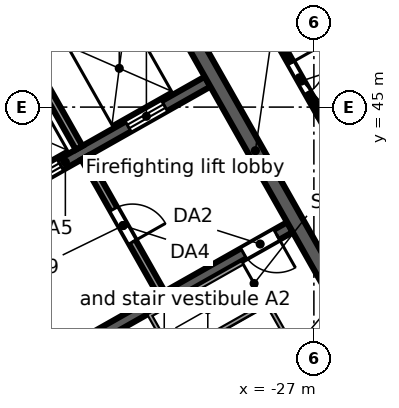
"""IFC4 building model, lengths in metres.
Left out: names, types, materials, properties, quantities, classifications, styles, units other than length and angle.
Written with IfcOpenShell. Run it as: python <this file> out.ifc"""

import sys

from ifc_helpers import new_model, si_unit, direction, frame, frame_2d, origin, place, context, subcontext, project, spatial, rectangle, extrude, element, fill, save


model = new_model("IFC4")
c1 = context("Model", 3, precision=1e-05, world=origin(), true_north=direction((0.0, 1.0)))
c2 = subcontext(c1, "Body", "Model", "MODEL_VIEW")
j1 = project(units=[si_unit("LENGTHUNIT", "METRE"), si_unit("PLANEANGLEUNIT", "RADIAN")], contexts=[c1])
p1 = place(None, origin())
s1 = spatial("IfcSite", under=j1, at=p1, CompositionType="ELEMENT")
p2 = place(p1, origin())
s2 = spatial("IfcBuilding", under=s1, at=p2, CompositionType="ELEMENT")
p3 = place(p2, frame((0.0, 0.0, 281.7)))
s3 = spatial("IfcBuildingStorey", under=s2, at=p3, CompositionType="ELEMENT", Elevation=281.7)
p4 = place(p3, frame((-58.732, 38.771, 0.0), z_axis=(0.0, 0.0, 1.0), x_axis=(0.870355615581, 0.492423702137, 0.0)))
e1 = element("IfcWall", 1, at=p4, inside=s3, PredefinedType="STANDARD", context=c2, shape_type="SweptSolid", body=[
    extrude(rectangle(XDim=64.052, YDim=0.25, at=frame_2d((32.026, 0.0))), origin(), (0.0, 0.0, 1.0), 3.45),
])
p5 = place(p4, frame((61.259, 0.0, 0.8)))
e2 = element("IfcOpeningElement", 2, at=p5, cuts=e1, PredefinedType="OPENING", context=c2, shape_type="SweptSolid", body=[
    extrude(rectangle(XDim=2.4, YDim=2.2, at=frame_2d((1.2, 1.1))), frame((0.0, 0.135, 0.0), z_axis=(0.0, -1.0, 0.0), x_axis=(1.0, 0.0, 0.0)), (0.0, 0.0, 1.0), 0.27),
])
p6 = place(p4, frame((58.216, 0.0, 0.8)))
e3 = element("IfcOpeningElement", 3, at=p6, cuts=e1, PredefinedType="OPENING", context=c2, shape_type="SweptSolid", body=[
    extrude(rectangle(XDim=2.4, YDim=2.2, at=frame_2d((1.2, 1.1))), frame((0.0, 0.135, 0.0), z_axis=(0.0, -1.0, 0.0), x_axis=(1.0, 0.0, 0.0)), (0.0, 0.0, 1.0), 0.27),
])
p7 = place(p4, frame((55.173, 0.0, 0.8)))
e4 = element("IfcOpeningElement", 4, at=p7, cuts=e1, PredefinedType="OPENING", context=c2, shape_type="SweptSolid", body=[
    extrude(rectangle(XDim=2.4, YDim=2.2, at=frame_2d((1.2, 1.1))), frame((0.0, 0.135, 0.0), z_axis=(0.0, -1.0, 0.0), x_axis=(1.0, 0.0, 0.0)), (0.0, 0.0, 1.0), 0.27),
])
p8 = place(p4, frame((52.129, 0.0, 0.8)))
e5 = element("IfcOpeningElement", 5, at=p8, cuts=e1, PredefinedType="OPENING", context=c2, shape_type="SweptSolid", body=[
    extrude(rectangle(XDim=2.4, YDim=2.2, at=frame_2d((1.2, 1.1))), frame((0.0, 0.135, 0.0), z_axis=(0.0, -1.0, 0.0), x_axis=(1.0, 0.0, 0.0)), (0.0, 0.0, 1.0), 0.27),
])
p9 = place(p4, frame((49.086, 0.0, 0.8)))
e6 = element("IfcOpeningElement", 6, at=p9, cuts=e1, PredefinedType="OPENING", context=c2, shape_type="SweptSolid", body=[
    extrude(rectangle(XDim=2.4, YDim=2.2, at=frame_2d((1.2, 1.1))), frame((0.0, 0.135, 0.0), z_axis=(0.0, -1.0, 0.0), x_axis=(1.0, 0.0, 0.0)), (0.0, 0.0, 1.0), 0.27),
])
p10 = place(p4, frame((46.043, 0.0, 0.8)))
e7 = element("IfcOpeningElement", 7, at=p10, cuts=e1, PredefinedType="OPENING", context=c2, shape_type="SweptSolid", body=[
    extrude(rectangle(XDim=2.4, YDim=2.2, at=frame_2d((1.2, 1.1))), frame((0.0, 0.135, 0.0), z_axis=(0.0, -1.0, 0.0), x_axis=(1.0, 0.0, 0.0)), (0.0, 0.0, 1.0), 0.27),
])
p11 = place(p4, frame((43.0, 0.0, 0.8)))
e8 = element("IfcOpeningElement", 8, at=p11, cuts=e1, PredefinedType="OPENING", context=c2, shape_type="SweptSolid", body=[
    extrude(rectangle(XDim=2.4, YDim=2.2, at=frame_2d((1.2, 1.1))), frame((0.0, 0.135, 0.0), z_axis=(0.0, -1.0, 0.0), x_axis=(1.0, 0.0, 0.0)), (0.0, 0.0, 1.0), 0.27),
])
p12 = place(p4, frame((39.956, 0.0, 0.8)))
e9 = element("IfcOpeningElement", 9, at=p12, cuts=e1, PredefinedType="OPENING", context=c2, shape_type="SweptSolid", body=[
    extrude(rectangle(XDim=2.4, YDim=2.2, at=frame_2d((1.2, 1.1))), frame((0.0, 0.135, 0.0), z_axis=(0.0, -1.0, 0.0), x_axis=(1.0, 0.0, 0.0)), (0.0, 0.0, 1.0), 0.27),
])
p13 = place(p4, frame((36.913, 0.0, 0.8)))
e10 = element("IfcOpeningElement", 10, at=p13, cuts=e1, PredefinedType="OPENING", context=c2, shape_type="SweptSolid", body=[
    extrude(rectangle(XDim=2.4, YDim=2.2, at=frame_2d((1.2, 1.1))), frame((0.0, 0.135, 0.0), z_axis=(0.0, -1.0, 0.0), x_axis=(1.0, 0.0, 0.0)), (0.0, 0.0, 1.0), 0.27),
])
p14 = place(p4, frame((33.87, 0.0, 0.8)))
e11 = element("IfcOpeningElement", 11, at=p14, cuts=e1, PredefinedType="OPENING", context=c2, shape_type="SweptSolid", body=[
    extrude(rectangle(XDim=2.4, YDim=2.2, at=frame_2d((1.2, 1.1))), frame((0.0, 0.135, 0.0), z_axis=(0.0, -1.0, 0.0), x_axis=(1.0, 0.0, 0.0)), (0.0, 0.0, 1.0), 0.27),
])
p15 = place(p4, frame((30.826, 0.0, 0.8)))
e12 = element("IfcOpeningElement", 12, at=p15, cuts=e1, PredefinedType="OPENING", context=c2, shape_type="SweptSolid", body=[
    extrude(rectangle(XDim=2.4, YDim=2.2, at=frame_2d((1.2, 1.1))), frame((0.0, 0.135, 0.0), z_axis=(0.0, -1.0, 0.0), x_axis=(1.0, 0.0, 0.0)), (0.0, 0.0, 1.0), 0.27),
])
p16 = place(p4, frame((27.783, 0.0, 0.8)))
e13 = element("IfcOpeningElement", 13, at=p16, cuts=e1, PredefinedType="OPENING", context=c2, shape_type="SweptSolid", body=[
    extrude(rectangle(XDim=2.4, YDim=2.2, at=frame_2d((1.2, 1.1))), frame((0.0, 0.135, 0.0), z_axis=(0.0, -1.0, 0.0), x_axis=(1.0, 0.0, 0.0)), (0.0, 0.0, 1.0), 0.27),
])
p17 = place(p4, frame((24.74, 0.0, 0.8)))
e14 = element("IfcOpeningElement", 14, at=p17, cuts=e1, PredefinedType="OPENING", context=c2, shape_type="SweptSolid", body=[
    extrude(rectangle(XDim=2.4, YDim=2.2, at=frame_2d((1.2, 1.1))), frame((0.0, 0.135, 0.0), z_axis=(0.0, -1.0, 0.0), x_axis=(1.0, 0.0, 0.0)), (0.0, 0.0, 1.0), 0.27),
])
p18 = place(p4, frame((21.696, 0.0, 0.8)))
e15 = element("IfcOpeningElement", 15, at=p18, cuts=e1, PredefinedType="OPENING", context=c2, shape_type="SweptSolid", body=[
    extrude(rectangle(XDim=2.4, YDim=2.2, at=frame_2d((1.2, 1.1))), frame((0.0, 0.135, 0.0), z_axis=(0.0, -1.0, 0.0), x_axis=(1.0, 0.0, 0.0)), (0.0, 0.0, 1.0), 0.27),
])
p19 = place(p4, frame((18.653, 0.0, 0.8)))
e16 = element("IfcOpeningElement", 16, at=p19, cuts=e1, PredefinedType="OPENING", context=c2, shape_type="SweptSolid", body=[
    extrude(rectangle(XDim=2.4, YDim=2.2, at=frame_2d((1.2, 1.1))), frame((0.0, 0.135, 0.0), z_axis=(0.0, -1.0, 0.0), x_axis=(1.0, 0.0, 0.0)), (0.0, 0.0, 1.0), 0.27),
])
p20 = place(p4, frame((15.61, 0.0, 0.8)))
e17 = element("IfcOpeningElement", 17, at=p20, cuts=e1, PredefinedType="OPENING", context=c2, shape_type="SweptSolid", body=[
    extrude(rectangle(XDim=2.4, YDim=2.2, at=frame_2d((1.2, 1.1))), frame((0.0, 0.135, 0.0), z_axis=(0.0, -1.0, 0.0), x_axis=(1.0, 0.0, 0.0)), (0.0, 0.0, 1.0), 0.27),
])
p21 = place(p4, frame((12.567, 0.0, 0.8)))
e18 = element("IfcOpeningElement", 18, at=p21, cuts=e1, PredefinedType="OPENING", context=c2, shape_type="SweptSolid", body=[
    extrude(rectangle(XDim=2.4, YDim=2.2, at=frame_2d((1.2, 1.1))), frame((0.0, 0.135, 0.0), z_axis=(0.0, -1.0, 0.0), x_axis=(1.0, 0.0, 0.0)), (0.0, 0.0, 1.0), 0.27),
])
p22 = place(p4, frame((9.523, 0.0, 0.8)))
e19 = element("IfcOpeningElement", 19, at=p22, cuts=e1, PredefinedType="OPENING", context=c2, shape_type="SweptSolid", body=[
    extrude(rectangle(XDim=2.4, YDim=2.2, at=frame_2d((1.2, 1.1))), frame((0.0, 0.135, 0.0), z_axis=(0.0, -1.0, 0.0), x_axis=(1.0, 0.0, 0.0)), (0.0, 0.0, 1.0), 0.27),
])
p23 = place(p4, frame((6.48, 0.0, 0.8)))
e20 = element("IfcOpeningElement", 20, at=p23, cuts=e1, PredefinedType="OPENING", context=c2, shape_type="SweptSolid", body=[
    extrude(rectangle(XDim=2.4, YDim=2.2, at=frame_2d((1.2, 1.1))), frame((0.0, 0.135, 0.0), z_axis=(0.0, -1.0, 0.0), x_axis=(1.0, 0.0, 0.0)), (0.0, 0.0, 1.0), 0.27),
])
p24 = place(p4, frame((3.437, 0.0, 0.8)))
e21 = element("IfcOpeningElement", 21, at=p24, cuts=e1, PredefinedType="OPENING", context=c2, shape_type="SweptSolid", body=[
    extrude(rectangle(XDim=2.4, YDim=2.2, at=frame_2d((1.2, 1.1))), frame((0.0, 0.135, 0.0), z_axis=(0.0, -1.0, 0.0), x_axis=(1.0, 0.0, 0.0)), (0.0, 0.0, 1.0), 0.27),
])
p25 = place(p4, frame((0.393, 0.0, 0.8)))
e22 = element("IfcOpeningElement", 22, at=p25, cuts=e1, PredefinedType="OPENING", context=c2, shape_type="SweptSolid", body=[
    extrude(rectangle(XDim=2.4, YDim=2.2, at=frame_2d((1.2, 1.1))), frame((0.0, 0.135, 0.0), z_axis=(0.0, -1.0, 0.0), x_axis=(1.0, 0.0, 0.0)), (0.0, 0.0, 1.0), 0.27),
])
p26 = place(p3, frame((-3.017, 46.293, 0.0), z_axis=(0.0, 0.0, 1.0), x_axis=(-0.870355474887, -0.492423950812, 0.0)))
e23 = element("IfcWall", 23, at=p26, inside=s3, PredefinedType="STANDARD", context=c2, shape_type="SweptSolid", body=[
    extrude(rectangle(XDim=40.34, YDim=0.25, at=frame_2d((20.17, 0.0))), origin(), (0.0, 0.0, 1.0), 3.45),
])
p27 = place(p26, frame((37.428, 0.0, 0.8)))
e24 = element("IfcOpeningElement", 24, at=p27, cuts=e23, PredefinedType="OPENING", context=c2, shape_type="SweptSolid", body=[
    extrude(rectangle(XDim=2.4, YDim=2.2, at=frame_2d((1.2, 1.1))), frame((0.0, 0.135, 0.0), z_axis=(0.0, -1.0, 0.0), x_axis=(1.0, 0.0, 0.0)), (0.0, 0.0, 1.0), 0.27),
])
p28 = place(p26, frame((34.372, 0.0, 0.0)))
e25 = element("IfcOpeningElement", 25, at=p28, cuts=e23, PredefinedType="OPENING", context=c2, shape_type="SweptSolid", body=[
    extrude(rectangle(XDim=1.8, YDim=2.4, at=frame_2d((0.9, 1.2))), frame((0.0, 0.135, 0.0), z_axis=(0.0, -1.0, 0.0), x_axis=(1.0, 0.0, 0.0)), (0.0, 0.0, 1.0), 0.27),
])
p29 = place(p26, frame((30.716, 0.0, 0.8)))
e26 = element("IfcOpeningElement", 26, at=p29, cuts=e23, PredefinedType="OPENING", context=c2, shape_type="SweptSolid", body=[
    extrude(rectangle(XDim=2.4, YDim=2.2, at=frame_2d((1.2, 1.1))), frame((0.0, 0.135, 0.0), z_axis=(0.0, -1.0, 0.0), x_axis=(1.0, 0.0, 0.0)), (0.0, 0.0, 1.0), 0.27),
])
p30 = place(p26, frame((27.36, 0.0, 0.8)))
e27 = element("IfcOpeningElement", 27, at=p30, cuts=e23, PredefinedType="OPENING", context=c2, shape_type="SweptSolid", body=[
    extrude(rectangle(XDim=2.4, YDim=2.2, at=frame_2d((1.2, 1.1))), frame((0.0, 0.135, 0.0), z_axis=(0.0, -1.0, 0.0), x_axis=(1.0, 0.0, 0.0)), (0.0, 0.0, 1.0), 0.27),
])
p31 = place(p26, frame((24.304, 0.0, 0.0)))
e28 = element("IfcOpeningElement", 28, at=p31, cuts=e23, PredefinedType="OPENING", context=c2, shape_type="SweptSolid", body=[
    extrude(rectangle(XDim=1.8, YDim=2.4, at=frame_2d((0.9, 1.2))), frame((0.0, 0.135, 0.0), z_axis=(0.0, -1.0, 0.0), x_axis=(1.0, 0.0, 0.0)), (0.0, 0.0, 1.0), 0.27),
])
p32 = place(p26, frame((20.648, 0.0, 0.8)))
e29 = element("IfcOpeningElement", 29, at=p32, cuts=e23, PredefinedType="OPENING", context=c2, shape_type="SweptSolid", body=[
    extrude(rectangle(XDim=2.4, YDim=2.2, at=frame_2d((1.2, 1.1))), frame((0.0, 0.135, 0.0), z_axis=(0.0, -1.0, 0.0), x_axis=(1.0, 0.0, 0.0)), (0.0, 0.0, 1.0), 0.27),
])
p33 = place(p26, frame((17.292, 0.0, 0.8)))
e30 = element("IfcOpeningElement", 30, at=p33, cuts=e23, PredefinedType="OPENING", context=c2, shape_type="SweptSolid", body=[
    extrude(rectangle(XDim=2.4, YDim=2.2, at=frame_2d((1.2, 1.1))), frame((0.0, 0.135, 0.0), z_axis=(0.0, -1.0, 0.0), x_axis=(1.0, 0.0, 0.0)), (0.0, 0.0, 1.0), 0.27),
])
p34 = place(p26, frame((14.236, 0.0, 0.0)))
e31 = element("IfcOpeningElement", 31, at=p34, cuts=e23, PredefinedType="OPENING", context=c2, shape_type="SweptSolid", body=[
    extrude(rectangle(XDim=1.8, YDim=2.4, at=frame_2d((0.9, 1.2))), frame((0.0, 0.135, 0.0), z_axis=(0.0, -1.0, 0.0), x_axis=(1.0, 0.0, 0.0)), (0.0, 0.0, 1.0), 0.27),
])
p35 = place(p26, frame((10.58, 0.0, 0.8)))
e32 = element("IfcOpeningElement", 32, at=p35, cuts=e23, PredefinedType="OPENING", context=c2, shape_type="SweptSolid", body=[
    extrude(rectangle(XDim=2.4, YDim=2.2, at=frame_2d((1.2, 1.1))), frame((0.0, 0.135, 0.0), z_axis=(0.0, -1.0, 0.0), x_axis=(1.0, 0.0, 0.0)), (0.0, 0.0, 1.0), 0.27),
])
p36 = place(p26, frame((7.224, 0.0, 0.8)))
e33 = element("IfcOpeningElement", 33, at=p36, cuts=e23, PredefinedType="OPENING", context=c2, shape_type="SweptSolid", body=[
    extrude(rectangle(XDim=2.4, YDim=2.2, at=frame_2d((1.2, 1.1))), frame((0.0, 0.135, 0.0), z_axis=(0.0, -1.0, 0.0), x_axis=(1.0, 0.0, 0.0)), (0.0, 0.0, 1.0), 0.27),
])
p37 = place(p26, frame((4.168, 0.0, 0.0)))
e34 = element("IfcOpeningElement", 34, at=p37, cuts=e23, PredefinedType="OPENING", context=c2, shape_type="SweptSolid", body=[
    extrude(rectangle(XDim=1.8, YDim=2.4, at=frame_2d((0.9, 1.2))), frame((0.0, 0.135, 0.0), z_axis=(0.0, -1.0, 0.0), x_axis=(1.0, 0.0, 0.0)), (0.0, 0.0, 1.0), 0.27),
])
p38 = place(p26, frame((0.512, 0.0, 0.8)))
e35 = element("IfcOpeningElement", 35, at=p38, cuts=e23, PredefinedType="OPENING", context=c2, shape_type="SweptSolid", body=[
    extrude(rectangle(XDim=2.4, YDim=2.2, at=frame_2d((1.2, 1.1))), frame((0.0, 0.135, 0.0), z_axis=(0.0, -1.0, 0.0), x_axis=(1.0, 0.0, 0.0)), (0.0, 0.0, 1.0), 0.27),
])
p39 = place(p3, frame((-34.245, 38.097, 0.0), z_axis=(0.0, 0.0, 1.0), x_axis=(0.870356351998, 0.492422400523, 0.0)))
e36 = element("IfcWall", 36, at=p39, inside=s3, PredefinedType="SOLIDWALL", context=c2, shape_type="SweptSolid", body=[
    extrude(rectangle(XDim=7.6, YDim=0.3, at=frame_2d((3.8, 0.0))), origin(), (0.0, 0.0, 1.0), 3.45),
])
p40 = place(p39, frame((6.2, 0.0, 0.0)))
e37 = element("IfcOpeningElement", 37, at=p40, cuts=e36, PredefinedType="OPENING", context=c2, shape_type="SweptSolid", body=[
    extrude(rectangle(XDim=1.0, YDim=2.1, at=frame_2d((0.5, 1.05))), frame((0.0, 0.16, 0.0), z_axis=(0.0, -1.0, 0.0), x_axis=(1.0, 0.0, 0.0)), (0.0, 0.0, 1.0), 0.32),
])
p41 = place(p3, frame((-37.282, 41.435, 0.0), z_axis=(0.0, 0.0, 1.0), x_axis=(0.870361315115, 0.492413628113, 0.0)))
e38 = element("IfcWall", 38, at=p41, inside=s3, PredefinedType="SOLIDWALL", context=c2, shape_type="SweptSolid", body=[
    extrude(rectangle(XDim=8.6, YDim=0.3, at=frame_2d((4.3, 0.0))), origin(), (0.0, 0.0, 1.0), 3.45),
])
p42 = place(p41, frame((0.65, 0.0, 0.0)))
e39 = element("IfcOpeningElement", 39, at=p42, cuts=e38, PredefinedType="OPENING", context=c2, shape_type="SweptSolid", body=[
    extrude(rectangle(XDim=1.1, YDim=2.1, at=frame_2d((0.55, 1.05))), frame((0.0, 0.16, 0.0), z_axis=(0.0, -1.0, 0.0), x_axis=(1.0, 0.0, 0.0)), (0.0, 0.0, 1.0), 0.32),
])
p43 = place(p41, frame((3.05, 0.0, 0.0)))
e40 = element("IfcOpeningElement", 40, at=p43, cuts=e38, PredefinedType="OPENING", context=c2, shape_type="SweptSolid", body=[
    extrude(rectangle(XDim=1.1, YDim=2.1, at=frame_2d((0.55, 1.05))), frame((0.0, 0.16, 0.0), z_axis=(0.0, -1.0, 0.0), x_axis=(1.0, 0.0, 0.0)), (0.0, 0.0, 1.0), 0.32),
])
p44 = place(p41, frame((6.2, 0.0, 0.0)))
e41 = element("IfcOpeningElement", 41, at=p44, cuts=e38, PredefinedType="OPENING", context=c2, shape_type="SweptSolid", body=[
    extrude(rectangle(XDim=1.1, YDim=2.1, at=frame_2d((0.55, 1.05))), frame((0.0, 0.16, 0.0), z_axis=(0.0, -1.0, 0.0), x_axis=(1.0, 0.0, 0.0)), (0.0, 0.0, 1.0), 0.32),
])
p45 = place(p3, frame((-46.51, 41.499, 0.0), z_axis=(0.0, 0.0, 1.0), x_axis=(0.870356271124, 0.492422543467, 0.0)))
e42 = element("IfcWall", 42, at=p45, inside=s3, PredefinedType="SOLIDWALL", context=c2, shape_type="SweptSolid", body=[
    extrude(rectangle(XDim=17.0, YDim=0.4, at=frame_2d((8.5, 0.0))), origin(), (0.0, 0.0, 1.0), 3.45),
])
p46 = place(p3, frame((-33.031, 43.667, 0.0), z_axis=(0.0, 0.0, 1.0), x_axis=(0.492408451753, -0.87036424366, 0.0)))
e43 = element("IfcWall", 43, at=p46, inside=s3, PredefinedType="PARTITIONING", context=c2, shape_type="SweptSolid", body=[
    extrude(rectangle(XDim=4.1, YDim=0.2, at=frame_2d((2.05, 0.0))), origin(), (0.0, 0.0, 1.0), 3.45),
])
p47 = place(p46, frame((1.55, 0.0, 0.0)))
e44 = element("IfcOpeningElement", 44, at=p47, cuts=e43, PredefinedType="OPENING", context=c2, shape_type="SweptSolid", body=[
    extrude(rectangle(XDim=1.0, YDim=2.1, at=frame_2d((0.5, 1.05))), frame((0.0, 0.11, 0.0), z_axis=(0.0, -1.0, 0.0), x_axis=(1.0, 0.0, 0.0)), (0.0, 0.0, 1.0), 0.22),
])
p48 = place(p3, frame((-35.271, 47.628, 0.0), z_axis=(0.0, 0.0, 1.0), x_axis=(0.492422543467, -0.870356271124, 0.0)))
e45 = element("IfcWall", 45, at=p48, inside=s3, PredefinedType="SOLIDWALL", context=c2, shape_type="SweptSolid", body=[
    extrude(rectangle(XDim=4.25, YDim=0.2, at=frame_2d((2.125, 0.0))), origin(), (0.0, 0.0, 1.0), 3.45),
])
p49 = place(p3, frame((-31.79, 49.597, 0.0), z_axis=(0.0, 0.0, 1.0), x_axis=(0.492421663121, -0.870356769198, 0.0)))
e46 = element("IfcWall", 46, at=p49, inside=s3, PredefinedType="SOLIDWALL", context=c2, shape_type="SweptSolid", body=[
    extrude(rectangle(XDim=13.2, YDim=0.4, at=frame_2d((6.6, 0.0))), origin(), (0.0, 0.0, 1.0), 3.45),
])
p50 = place(p3, frame((-27.827, 46.554, 0.0), z_axis=(0.0, 0.0, 1.0), x_axis=(0.492374954878, -0.870383193662, 0.0)))
e47 = element("IfcWall", 47, at=p50, inside=s3, PredefinedType="PARTITIONING", context=c2, shape_type="SweptSolid", body=[
    extrude(rectangle(XDim=2.0, YDim=0.15, at=frame_2d((1.0, 0.0))), origin(), (0.0, 0.0, 1.0), 2.622),
])
p51 = place(p50, frame((0.45, 0.0, 0.0)))
e48 = element("IfcOpeningElement", 48, at=p51, cuts=e47, PredefinedType="OPENING", context=c2, shape_type="SweptSolid", body=[
    extrude(rectangle(XDim=0.9, YDim=2.1, at=frame_2d((0.45, 1.05))), frame((0.0, 0.085, 0.0), z_axis=(0.0, -1.0, 0.0), x_axis=(1.0, 0.0, 0.0)), (0.0, 0.0, 1.0), 0.17),
])
p52 = place(p3, frame((-26.842, 44.813, 0.0), z_axis=(0.0, 0.0, 1.0), x_axis=(0.492365617434, -0.870388475779, 0.0)))
e49 = element("IfcWall", 49, at=p52, inside=s3, PredefinedType="PARTITIONING", context=c2, shape_type="SweptSolid", body=[
    extrude(rectangle(XDim=3.0, YDim=0.15, at=frame_2d((1.5, 0.0))), origin(), (0.0, 0.0, 1.0), 2.622),
])
p53 = place(p52, frame((0.95, 0.0, 0.0)))
e50 = element("IfcOpeningElement", 50, at=p53, cuts=e49, PredefinedType="OPENING", context=c2, shape_type="SweptSolid", body=[
    extrude(rectangle(XDim=0.9, YDim=2.1, at=frame_2d((0.45, 1.05))), frame((0.0, 0.085, 0.0), z_axis=(0.0, -1.0, 0.0), x_axis=(1.0, 0.0, 0.0)), (0.0, 0.0, 1.0), 0.17),
])
p54 = place(p43, origin())
e51 = element("IfcDoor", 51, at=p54, inside=s3, OperationType="DOUBLE_DOOR_SLIDING", PredefinedType="DOOR", context=c2, shape_type="SweptSolid", body=[
    extrude(rectangle(XDim=1.1, YDim=2.1, at=frame_2d((0.55, 1.05))), frame((0.0, 0.025, 0.0), z_axis=(0.0, -1.0, 0.0), x_axis=(1.0, 0.0, 0.0)), (0.0, 0.0, 1.0), 0.05),
])
fill(e40, e51)
p55 = place(p44, origin())
e52 = element("IfcDoor", 52, at=p55, inside=s3, OperationType="DOUBLE_DOOR_SLIDING", PredefinedType="DOOR", context=c2, shape_type="SweptSolid", body=[
    extrude(rectangle(XDim=1.1, YDim=2.1, at=frame_2d((0.55, 1.05))), frame((0.0, 0.025, 0.0), z_axis=(0.0, -1.0, 0.0), x_axis=(1.0, 0.0, 0.0)), (0.0, 0.0, 1.0), 0.05),
])
fill(e41, e52)
p56 = place(p40, frame((1.0, 0.0, 0.0), z_axis=(0.0, 0.0, 1.0), x_axis=(-1.0, 0.0, 0.0)))
e53 = element("IfcDoor", 53, at=p56, inside=s3, OperationType="SINGLE_SWING_LEFT", PredefinedType="DOOR", context=c2, shape_type="SweptSolid", body=[
    extrude(rectangle(XDim=1.0, YDim=2.1, at=frame_2d((0.5, 1.05))), frame((0.0, 0.025, 0.0), z_axis=(0.0, -1.0, 0.0), x_axis=(1.0, 0.0, 0.0)), (0.0, 0.0, 1.0), 0.05),
])
fill(e37, e53)
p57 = place(p47, origin())
e54 = element("IfcDoor", 54, at=p57, inside=s3, OperationType="SINGLE_SWING_RIGHT", PredefinedType="DOOR", context=c2, shape_type="SweptSolid", body=[
    extrude(rectangle(XDim=1.0, YDim=2.1, at=frame_2d((0.5, 1.05))), frame((0.0, 0.025, 0.0), z_axis=(0.0, -1.0, 0.0), x_axis=(1.0, 0.0, 0.0)), (0.0, 0.0, 1.0), 0.05),
])
fill(e44, e54)
p58 = place(p51, origin())
e55 = element("IfcDoor", 55, at=p58, inside=s3, OperationType="SINGLE_SWING_LEFT", PredefinedType="DOOR", context=c2, shape_type="SweptSolid", body=[
    extrude(rectangle(XDim=0.9, YDim=2.1, at=frame_2d((0.45, 1.05))), frame((0.0, 0.025, 0.0), z_axis=(0.0, -1.0, 0.0), x_axis=(1.0, 0.0, 0.0)), (0.0, 0.0, 1.0), 0.05),
])
fill(e48, e55)
save(model, sys.argv[1])
